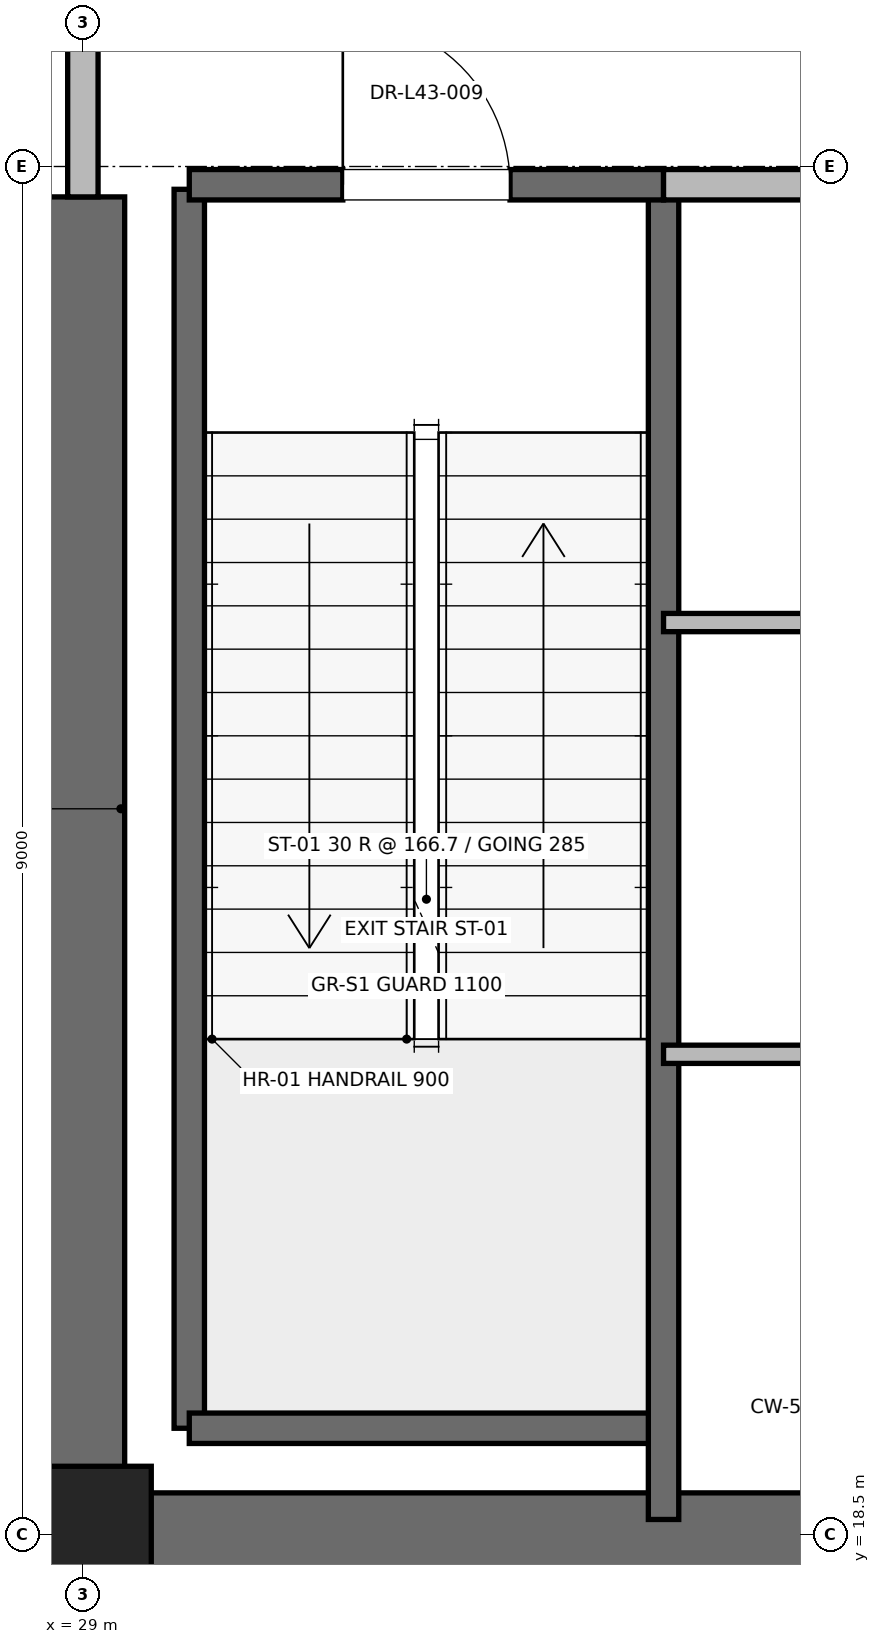
"""IFC4 building model, lengths in metres.
Left out: names, types, materials, properties, quantities, classifications, styles, units other than length and angle.
Written with IfcOpenShell. Run it as: python <this file> out.ifc"""

import sys

from ifc_helpers import new_model, si_unit, direction, frame, frame_2d, origin, origin_2d, place, context, subcontext, project, spatial, rectangle, extrude, element, fill, save


model = new_model("IFC4")
c1 = context("Model", 3, precision=1e-05, world=origin(), true_north=direction((0.0, 1.0)))
c2 = subcontext(c1, "Body", "Model", "MODEL_VIEW")
j1 = project(units=[si_unit("LENGTHUNIT", "METRE"), si_unit("PLANEANGLEUNIT", "RADIAN")], contexts=[c1])
p1 = place(None, origin())
s1 = spatial("IfcSite", under=j1, at=p1, CompositionType="ELEMENT")
p2 = place(p1, origin())
s2 = spatial("IfcBuilding", under=s1, at=p2, CompositionType="ELEMENT")
p3 = place(p2, frame((0.0, 0.0, 184.4)))
s3 = spatial("IfcBuildingStorey", under=s2, at=p3, CompositionType="ELEMENT", Elevation=184.4)
p4 = place(p3, frame((29.0, 18.5, 0.0), z_axis=(0.0, 0.0, 1.0), x_axis=(1.0, 0.0, 0.0)))
e1 = element("IfcColumn", 1, at=p4, inside=s3, PredefinedType="PILASTER", context=c2, shape_type="SweptSolid", body=[
    extrude(rectangle(XDim=0.9, YDim=0.9, at=origin_2d()), origin(), (0.0, 0.0, 1.0), 5.0),
])
p5 = place(p3, frame((29.0, 18.5, 0.0), z_axis=(0.0, 0.0, 1.0), x_axis=(1.0, 0.0, 0.0)))
e2 = element("IfcWall", 2, at=p5, inside=s3, PredefinedType="SHEAR", context=c2, shape_type="SweptSolid", body=[
    extrude(rectangle(XDim=9.2, YDim=0.55, at=frame_2d((4.6, 0.0))), origin(), (0.0, 0.0, 1.0), 4.7),
])
p6 = place(p3, frame((29.0, 18.5, 0.0), z_axis=(0.0, 0.0, 1.0), x_axis=(0.0, 1.0, 0.0)))
e3 = element("IfcWall", 3, at=p6, inside=s3, PredefinedType="SHEAR", context=c2, shape_type="SweptSolid", body=[
    extrude(rectangle(XDim=8.8, YDim=0.55, at=frame_2d((4.4, 0.0))), origin(), (0.0, 0.0, 1.0), 4.7),
])
p7 = place(p3, frame((29.7, 19.2, 0.0), z_axis=(0.0, 0.0, 1.0), x_axis=(0.0, 1.0, 0.0)))
e4 = element("IfcWall", 4, at=p7, inside=s3, PredefinedType="SOLIDWALL", context=c2, shape_type="SweptSolid", body=[
    extrude(rectangle(XDim=8.15, YDim=0.2, at=frame_2d((4.075, 0.0))), origin(), (0.0, 0.0, 1.0), 4.7),
])
p8 = place(p3, frame((29.7, 19.2, 0.0), z_axis=(0.0, 0.0, 1.0), x_axis=(1.0, 0.0, 0.0)))
e5 = element("IfcWall", 5, at=p8, inside=s3, PredefinedType="SOLIDWALL", context=c2, shape_type="SweptSolid", body=[
    extrude(rectangle(XDim=3.12, YDim=0.2, at=frame_2d((1.56, 0.0))), origin(), (0.0, 0.0, 1.0), 4.7),
])
p9 = place(p3, frame((32.82, 18.6, 0.0), z_axis=(0.0, 0.0, 1.0), x_axis=(0.0, 1.0, 0.0)))
e6 = element("IfcWall", 6, at=p9, inside=s3, PredefinedType="SOLIDWALL", context=c2, shape_type="SweptSolid", body=[
    extrude(rectangle(XDim=8.78, YDim=0.2, at=frame_2d((4.39, 0.0))), origin(), (0.0, 0.0, 1.0), 4.7),
])
p10 = place(p3, frame((29.7, 27.38, 0.0), z_axis=(0.0, 0.0, 1.0), x_axis=(1.0, 0.0, 0.0)))
e7 = element("IfcWall", 7, at=p10, inside=s3, PredefinedType="SOLIDWALL", context=c2, shape_type="SweptSolid", body=[
    extrude(rectangle(XDim=3.12, YDim=0.2, at=frame_2d((1.56, 0.0))), origin(), (0.0, 0.0, 1.0), 4.7),
])
p11 = place(p10, frame((1.01, 0.0, 0.0)))
e8 = element("IfcOpeningElement", 8, at=p11, cuts=e7, PredefinedType="OPENING", context=c2, shape_type="SweptSolid", body=[
    extrude(rectangle(XDim=1.1, YDim=2.15, at=frame_2d((0.55, 1.075))), frame((0.0, 0.1, 0.0), z_axis=(0.0, -1.0, 0.0), x_axis=(1.0, 0.0, 0.0)), (0.0, 0.0, 1.0), 0.2),
])
p12 = place(p3, frame((29.0, 27.3, 0.0), z_axis=(0.0, 0.0, 1.0), x_axis=(0.0, 1.0, 0.0)))
e9 = element("IfcWall", 9, at=p12, inside=s3, PredefinedType="PARTITIONING", context=c2, shape_type="SweptSolid", body=[
    extrude(rectangle(XDim=3.4, YDim=0.2, at=frame_2d((1.7, 0.0))), origin(), (0.0, 0.0, 1.0), 3.68),
])
p13 = place(p12, frame((1.125, 0.0, 0.0)))
e10 = element("IfcOpeningElement", 10, at=p13, cuts=e9, PredefinedType="OPENING", context=c2, shape_type="SweptSolid", body=[
    extrude(rectangle(XDim=1.15, YDim=2.2, at=frame_2d((0.575, 1.1))), frame((0.0, 0.1, 0.0), z_axis=(0.0, -1.0, 0.0), x_axis=(1.0, 0.0, 0.0)), (0.0, 0.0, 1.0), 0.2),
])
p14 = place(p3, frame((32.82, 27.38, 0.0), z_axis=(0.0, 0.0, 1.0), x_axis=(1.0, 0.0, 0.0)))
e11 = element("IfcWall", 11, at=p14, inside=s3, PredefinedType="PARTITIONING", context=c2, shape_type="SweptSolid", body=[
    extrude(rectangle(XDim=5.62, YDim=0.2, at=frame_2d((2.81, 0.0))), origin(), (0.0, 0.0, 1.0), 4.7),
])
for number, where, z_axis, x_axis in (
    (12, (32.82, 21.66, 0.0), (0.0, 0.0, 1.0), (1.0, 0.0, 0.0)),
    (13, (32.82, 24.5, 0.0), (0.0, 0.0, 1.0), (1.0, 0.0, 0.0)),
):
    element("IfcWall", number, at=place(p3, frame(where, z_axis=z_axis, x_axis=x_axis)), inside=s3, PredefinedType="PARTITIONING", context=c2, shape_type="SweptSolid", body=[
        extrude(rectangle(XDim=5.23, YDim=0.12, at=frame_2d((2.615, 0.0))), origin(), (0.0, 0.0, 1.0), 2.85),
    ])
p15 = place(p11, origin())
e14 = element("IfcDoor", 14, at=p15, inside=s3, OperationType="SINGLE_SWING_LEFT", PredefinedType="DOOR", context=c2, shape_type="SweptSolid", body=[
    extrude(rectangle(XDim=1.1, YDim=2.15, at=frame_2d((0.55, 1.075))), frame((0.0, 0.025, 0.0), z_axis=(0.0, -1.0, 0.0), x_axis=(1.0, 0.0, 0.0)), (0.0, 0.0, 1.0), 0.05),
])
fill(e8, e14)
save(model, sys.argv[1])
